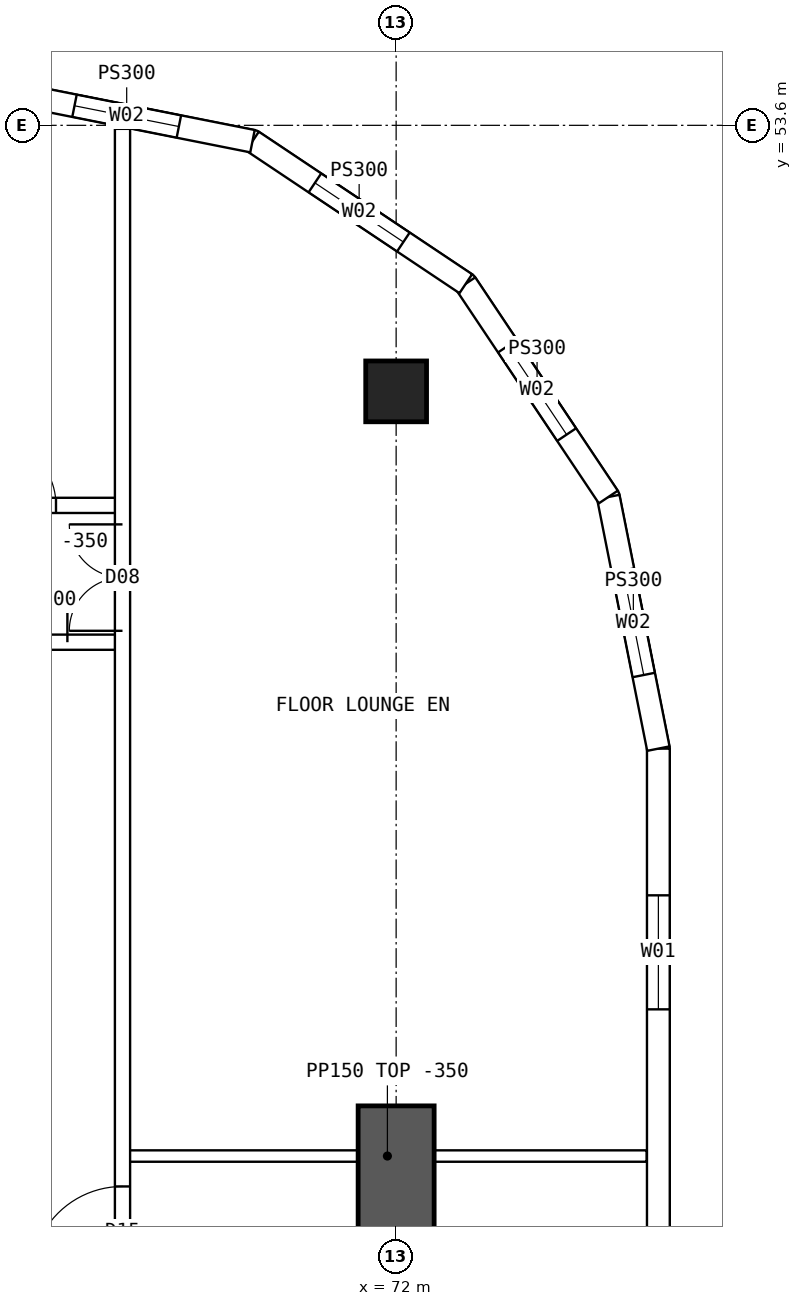
"""IFC4 building model, lengths in metres.
Left out: names, types, materials, properties, quantities, classifications, styles, units other than length and angle.
Written with IfcOpenShell. Run it as: python <this file> out.ifc"""

import sys

from ifc_helpers import new_model, si_unit, direction, frame, frame_2d, origin, origin_2d, place, context, subcontext, project, spatial, polyline, rectangle, hollow_rectangle, outline, extrude, element, fill, save


model = new_model("IFC4")
c1 = context("Model", 3, precision=1e-05, world=origin(), true_north=direction((0.0, 1.0)))
c2 = subcontext(c1, "Body", "Model", "MODEL_VIEW")
j1 = project(units=[si_unit("LENGTHUNIT", "METRE"), si_unit("PLANEANGLEUNIT", "RADIAN")], contexts=[c1])
p1 = place(None, origin())
s1 = spatial("IfcSite", under=j1, at=p1, CompositionType="ELEMENT")
p2 = place(p1, origin())
s2 = spatial("IfcBuilding", under=s1, at=p2, CompositionType="ELEMENT")
p3 = place(p2, frame((0.0, 0.0, 197.35)))
s3 = spatial("IfcBuildingStorey", under=s2, at=p3, CompositionType="ELEMENT", Elevation=197.35)
p4 = place(p3, frame((72.0, 50.1, 0.0), z_axis=(0.0, 0.0, 1.0), x_axis=(1.0, 0.0, 0.0)))
e1 = element("IfcColumn", 1, at=p4, inside=s3, PredefinedType="COLUMN", context=c2, shape_type="SweptSolid", body=[
    extrude(hollow_rectangle(XDim=0.8, YDim=0.8, WallThickness=0.08, at=origin_2d()), origin(), (0.0, 0.0, 1.0), 3.75),
])
p5 = place(p3, frame((72.0, 35.7, 0.0), z_axis=(0.0, 0.0, 1.0), x_axis=(0.0, 1.0, 0.0)))
e2 = element("IfcWall", 2, at=p5, inside=s3, PredefinedType="SHEAR", context=c2, shape_type="SweptSolid", body=[
    extrude(rectangle(XDim=5.0, YDim=1.0, at=frame_2d((2.5, 0.0))), origin(), (0.0, 0.0, 1.0), 3.75),
])
p6 = place(p3, frame((75.45, 18.6, 0.0), z_axis=(0.0, 0.0, 1.0), x_axis=(0.0, 1.0, 0.0)))
e3 = element("IfcWall", 3, at=p6, inside=s3, PredefinedType="SOLIDWALL", context=c2, shape_type="SweptSolid", body=[
    extrude(outline(polyline([(-0.015, -0.15), (26.815, -0.15), (26.785, 0.15), (0.015, 0.15), (-0.015, -0.15)])), origin(), (0.0, 0.0, 1.0), 3.4),
])
p7 = place(p6, frame((1.93, 0.0, 0.9)))
e4 = element("IfcOpeningElement", 4, at=p7, cuts=e3, PredefinedType="OPENING", context=c2, shape_type="SweptSolid", body=[
    extrude(rectangle(XDim=1.5, YDim=2.0, at=frame_2d((0.75, 1.0))), frame((0.0, 0.16, 0.0), z_axis=(0.0, -1.0, 0.0), x_axis=(1.0, 0.0, 0.0)), (0.0, 0.0, 1.0), 0.32),
])
p8 = place(p6, frame((7.29, 0.0, 0.9)))
e5 = element("IfcOpeningElement", 5, at=p8, cuts=e3, PredefinedType="OPENING", context=c2, shape_type="SweptSolid", body=[
    extrude(rectangle(XDim=1.5, YDim=2.0, at=frame_2d((0.75, 1.0))), frame((0.0, 0.16, 0.0), z_axis=(0.0, -1.0, 0.0), x_axis=(1.0, 0.0, 0.0)), (0.0, 0.0, 1.0), 0.32),
])
p9 = place(p6, frame((12.65, 0.0, 0.9)))
e6 = element("IfcOpeningElement", 6, at=p9, cuts=e3, PredefinedType="OPENING", context=c2, shape_type="SweptSolid", body=[
    extrude(rectangle(XDim=1.5, YDim=2.0, at=frame_2d((0.75, 1.0))), frame((0.0, 0.16, 0.0), z_axis=(0.0, -1.0, 0.0), x_axis=(1.0, 0.0, 0.0)), (0.0, 0.0, 1.0), 0.32),
])
p10 = place(p6, frame((18.01, 0.0, 0.9)))
e7 = element("IfcOpeningElement", 7, at=p10, cuts=e3, PredefinedType="OPENING", context=c2, shape_type="SweptSolid", body=[
    extrude(rectangle(XDim=1.5, YDim=2.0, at=frame_2d((0.75, 1.0))), frame((0.0, 0.16, 0.0), z_axis=(0.0, -1.0, 0.0), x_axis=(1.0, 0.0, 0.0)), (0.0, 0.0, 1.0), 0.32),
])
p11 = place(p6, frame((23.37, 0.0, 0.9)))
e8 = element("IfcOpeningElement", 8, at=p11, cuts=e3, PredefinedType="OPENING", context=c2, shape_type="SweptSolid", body=[
    extrude(rectangle(XDim=1.5, YDim=2.0, at=frame_2d((0.75, 1.0))), frame((0.0, 0.16, 0.0), z_axis=(0.0, -1.0, 0.0), x_axis=(1.0, 0.0, 0.0)), (0.0, 0.0, 1.0), 0.32),
])
p12 = place(p3, frame((75.45, 45.4, 0.0), z_axis=(0.0, 0.0, 1.0), x_axis=(-0.19508664885, 0.980786011034, 0.0)))
e9 = element("IfcWall", 9, at=p12, inside=s3, PredefinedType="SOLIDWALL", context=c2, shape_type="SweptSolid", body=[
    extrude(outline(polyline([(-0.015, -0.15), (3.405, -0.15), (3.345, 0.15), (0.015, 0.15), (-0.015, -0.15)])), origin(), (0.0, 0.0, 1.0), 3.4),
])
p13 = place(p12, frame((0.988, 0.0, 0.9)))
e10 = element("IfcOpeningElement", 10, at=p13, cuts=e9, PredefinedType="OPENING", context=c2, shape_type="SweptSolid", body=[
    extrude(rectangle(XDim=1.4, YDim=1.8, at=frame_2d((0.7, 0.9))), frame((0.0, 0.16, 0.0), z_axis=(0.0, -1.0, 0.0), x_axis=(1.0, 0.0, 0.0)), (0.0, 0.0, 1.0), 0.32),
])
p14 = place(p3, frame((74.792, 48.71, 0.0), z_axis=(0.0, 0.0, 1.0), x_axis=(-0.555534554399, 0.831493450887, 0.0)))
e11 = element("IfcWall", 11, at=p14, inside=s3, PredefinedType="SOLIDWALL", context=c2, shape_type="SweptSolid", body=[
    extrude(outline(polyline([(-0.03, -0.15), (3.405, -0.15), (3.345, 0.15), (0.03, 0.15), (-0.03, -0.15)])), origin(), (0.0, 0.0, 1.0), 3.4),
])
p15 = place(p14, frame((0.988, 0.0, 0.9)))
e12 = element("IfcOpeningElement", 12, at=p15, cuts=e11, PredefinedType="OPENING", context=c2, shape_type="SweptSolid", body=[
    extrude(rectangle(XDim=1.4, YDim=1.8, at=frame_2d((0.7, 0.9))), frame((0.0, 0.16, 0.0), z_axis=(0.0, -1.0, 0.0), x_axis=(1.0, 0.0, 0.0)), (0.0, 0.0, 1.0), 0.32),
])
p16 = place(p3, frame((72.917, 51.517, 0.0), z_axis=(0.0, 0.0, 1.0), x_axis=(-0.831493450887, 0.555534554399, 0.0)))
e13 = element("IfcWall", 13, at=p16, inside=s3, PredefinedType="SOLIDWALL", context=c2, shape_type="SweptSolid", body=[
    extrude(outline(polyline([(-0.03, -0.15), (3.405, -0.15), (3.345, 0.15), (0.03, 0.15), (-0.03, -0.15)])), origin(), (0.0, 0.0, 1.0), 3.4),
])
p17 = place(p16, frame((0.988, 0.0, 0.9)))
e14 = element("IfcOpeningElement", 14, at=p17, cuts=e13, PredefinedType="OPENING", context=c2, shape_type="SweptSolid", body=[
    extrude(rectangle(XDim=1.4, YDim=1.8, at=frame_2d((0.7, 0.9))), frame((0.0, 0.16, 0.0), z_axis=(0.0, -1.0, 0.0), x_axis=(1.0, 0.0, 0.0)), (0.0, 0.0, 1.0), 0.32),
])
p18 = place(p3, frame((70.11, 53.392, 0.0), z_axis=(0.0, 0.0, 1.0), x_axis=(-0.98078325777, 0.195100490205, 0.0)))
e15 = element("IfcWall", 15, at=p18, inside=s3, PredefinedType="SOLIDWALL", context=c2, shape_type="SweptSolid", body=[
    extrude(outline(polyline([(-0.03, -0.15), (3.405, -0.15), (3.345, 0.15), (0.03, 0.15), (-0.03, -0.15)])), origin(), (0.0, 0.0, 1.0), 3.4),
])
p19 = place(p18, frame((0.988, 0.0, 0.9)))
e16 = element("IfcOpeningElement", 16, at=p19, cuts=e15, PredefinedType="OPENING", context=c2, shape_type="SweptSolid", body=[
    extrude(rectangle(XDim=1.4, YDim=1.8, at=frame_2d((0.7, 0.9))), frame((0.0, 0.16, 0.0), z_axis=(0.0, -1.0, 0.0), x_axis=(1.0, 0.0, 0.0)), (0.0, 0.0, 1.0), 0.32),
])
p20 = place(p3, frame((66.425, 48.6, 0.0), z_axis=(0.0, 0.0, 1.0), x_axis=(1.0, 0.0, 0.0)))
e17 = element("IfcWall", 17, at=p20, inside=s3, PredefinedType="SOLIDWALL", context=c2, shape_type="SweptSolid", body=[
    extrude(rectangle(XDim=1.975, YDim=0.2, at=frame_2d((0.987, 0.0))), origin(), (0.0, 0.0, 1.0), 3.4),
])
p21 = place(p20, frame((0.2, 0.0, 0.0)))
e18 = element("IfcOpeningElement", 18, at=p21, cuts=e17, PredefinedType="OPENING", context=c2, shape_type="SweptSolid", body=[
    extrude(rectangle(XDim=0.9, YDim=2.1, at=frame_2d((0.45, 1.05))), frame((0.0, 0.11, 0.0), z_axis=(0.0, -1.0, 0.0), x_axis=(1.0, 0.0, 0.0)), (0.0, 0.0, 1.0), 0.22),
])
p22 = place(p3, frame((66.425, 46.8, 0.0), z_axis=(0.0, 0.0, 1.0), x_axis=(1.0, 0.0, 0.0)))
e19 = element("IfcWall", 19, at=p22, inside=s3, PredefinedType="SOLIDWALL", context=c2, shape_type="SweptSolid", body=[
    extrude(rectangle(XDim=1.975, YDim=0.2, at=frame_2d((0.987, 0.0))), origin(), (0.0, 0.0, 1.0), 3.4),
])
p23 = place(p22, frame((0.05, 0.0, 0.0)))
e20 = element("IfcOpeningElement", 20, at=p23, cuts=e19, PredefinedType="OPENING", context=c2, shape_type="SweptSolid", body=[
    extrude(rectangle(XDim=1.2, YDim=2.1, at=frame_2d((0.6, 1.05))), frame((0.0, 0.11, 0.0), z_axis=(0.0, -1.0, 0.0), x_axis=(1.0, 0.0, 0.0)), (0.0, 0.0, 1.0), 0.22),
])
p24 = place(p3, frame((68.4, 10.446, 0.0), z_axis=(0.0, 0.0, 1.0), x_axis=(0.0, 1.0, 0.0)))
e21 = element("IfcWall", 21, at=p24, inside=s3, PredefinedType="SOLIDWALL", context=c2, shape_type="SweptSolid", body=[
    extrude(rectangle(XDim=43.107, YDim=0.2, at=frame_2d((21.554, 0.0))), origin(), (0.0, 0.0, 1.0), 3.4),
])
p25 = place(p24, frame((27.994, 0.0, 0.0)))
e22 = element("IfcOpeningElement", 22, at=p25, cuts=e21, PredefinedType="OPENING", context=c2, shape_type="SweptSolid", body=[
    extrude(rectangle(XDim=1.2, YDim=2.1, at=frame_2d((0.6, 1.05))), frame((0.0, 0.11, 0.0), z_axis=(0.0, -1.0, 0.0), x_axis=(1.0, 0.0, 0.0)), (0.0, 0.0, 1.0), 0.22),
])
p26 = place(p24, frame((5.104, 0.0, 0.0)))
e23 = element("IfcOpeningElement", 23, at=p26, cuts=e21, PredefinedType="OPENING", context=c2, shape_type="SweptSolid", body=[
    extrude(rectangle(XDim=1.4, YDim=2.1, at=frame_2d((0.7, 1.05))), frame((0.0, 0.11, 0.0), z_axis=(0.0, -1.0, 0.0), x_axis=(1.0, 0.0, 0.0)), (0.0, 0.0, 1.0), 0.22),
])
p27 = place(p24, frame((36.504, 0.0, 0.0)))
e24 = element("IfcOpeningElement", 24, at=p27, cuts=e21, PredefinedType="OPENING", context=c2, shape_type="SweptSolid", body=[
    extrude(rectangle(XDim=1.4, YDim=2.1, at=frame_2d((0.7, 1.05))), frame((0.0, 0.11, 0.0), z_axis=(0.0, -1.0, 0.0), x_axis=(1.0, 0.0, 0.0)), (0.0, 0.0, 1.0), 0.22),
])
p28 = place(p3, frame((68.475, 40.04, 0.0), z_axis=(0.0, 0.0, 1.0), x_axis=(1.0, 0.0, 0.0)))
e25 = element("IfcWall", 25, at=p28, inside=s3, PredefinedType="PARTITIONING", context=c2, shape_type="SweptSolid", body=[
    extrude(rectangle(XDim=6.82, YDim=0.15, at=frame_2d((3.41, 0.0))), origin(), (0.0, 0.0, 1.0), 3.4),
])
p29 = place(p11, origin())
e26 = element("IfcWindow", 26, at=p29, inside=s3, PartitioningType="SINGLE_PANEL", PredefinedType="WINDOW", context=c2, shape_type="SweptSolid", body=[
    extrude(rectangle(XDim=1.5, YDim=2.0, at=frame_2d((0.75, 1.0))), frame((0.0, 0.03, 0.0), z_axis=(0.0, -1.0, 0.0), x_axis=(1.0, 0.0, 0.0)), (0.0, 0.0, 1.0), 0.06),
])
fill(e8, e26)
p30 = place(p13, origin())
e27 = element("IfcWindow", 27, at=p30, inside=s3, PartitioningType="SINGLE_PANEL", PredefinedType="WINDOW", context=c2, shape_type="SweptSolid", body=[
    extrude(rectangle(XDim=1.4, YDim=1.8, at=frame_2d((0.7, 0.9))), frame((0.0, 0.03, 0.0), z_axis=(0.0, -1.0, 0.0), x_axis=(1.0, 0.0, 0.0)), (0.0, 0.0, 1.0), 0.06),
])
fill(e10, e27)
p31 = place(p15, origin())
e28 = element("IfcWindow", 28, at=p31, inside=s3, PartitioningType="SINGLE_PANEL", PredefinedType="WINDOW", context=c2, shape_type="SweptSolid", body=[
    extrude(rectangle(XDim=1.4, YDim=1.8, at=frame_2d((0.7, 0.9))), frame((0.0, 0.03, 0.0), z_axis=(0.0, -1.0, 0.0), x_axis=(1.0, 0.0, 0.0)), (0.0, 0.0, 1.0), 0.06),
])
fill(e12, e28)
p32 = place(p17, origin())
e29 = element("IfcWindow", 29, at=p32, inside=s3, PartitioningType="SINGLE_PANEL", PredefinedType="WINDOW", context=c2, shape_type="SweptSolid", body=[
    extrude(rectangle(XDim=1.4, YDim=1.8, at=frame_2d((0.7, 0.9))), frame((0.0, 0.03, 0.0), z_axis=(0.0, -1.0, 0.0), x_axis=(1.0, 0.0, 0.0)), (0.0, 0.0, 1.0), 0.06),
])
fill(e14, e29)
p33 = place(p19, origin())
e30 = element("IfcWindow", 30, at=p33, inside=s3, PartitioningType="SINGLE_PANEL", PredefinedType="WINDOW", context=c2, shape_type="SweptSolid", body=[
    extrude(rectangle(XDim=1.4, YDim=1.8, at=frame_2d((0.7, 0.9))), frame((0.0, 0.03, 0.0), z_axis=(0.0, -1.0, 0.0), x_axis=(1.0, 0.0, 0.0)), (0.0, 0.0, 1.0), 0.06),
])
fill(e16, e30)
p34 = place(p23, origin())
e31 = element("IfcDoor", 31, at=p34, inside=s3, OperationType="DOUBLE_DOOR_SINGLE_SWING", PredefinedType="DOOR", context=c2, shape_type="SweptSolid", body=[
    extrude(rectangle(XDim=1.2, YDim=2.1, at=frame_2d((0.6, 1.05))), frame((0.0, 0.025, 0.0), z_axis=(0.0, -1.0, 0.0), x_axis=(1.0, 0.0, 0.0)), (0.0, 0.0, 1.0), 0.05),
])
fill(e20, e31)
p35 = place(p25, origin())
e32 = element("IfcDoor", 32, at=p35, inside=s3, OperationType="SINGLE_SWING_LEFT", PredefinedType="DOOR", context=c2, shape_type="SweptSolid", body=[
    extrude(rectangle(XDim=1.2, YDim=2.1, at=frame_2d((0.6, 1.05))), frame((0.0, 0.025, 0.0), z_axis=(0.0, -1.0, 0.0), x_axis=(1.0, 0.0, 0.0)), (0.0, 0.0, 1.0), 0.05),
])
fill(e22, e32)
p36 = place(p27, origin())
e33 = element("IfcDoor", 33, at=p36, inside=s3, OperationType="DOUBLE_DOOR_SINGLE_SWING", PredefinedType="DOOR", context=c2, shape_type="SweptSolid", body=[
    extrude(rectangle(XDim=1.4, YDim=2.1, at=frame_2d((0.7, 1.05))), frame((0.0, 0.025, 0.0), z_axis=(0.0, -1.0, 0.0), x_axis=(1.0, 0.0, 0.0)), (0.0, 0.0, 1.0), 0.05),
])
fill(e24, e33)
p37 = place(p21, origin())
e34 = element("IfcDoor", 34, at=p37, inside=s3, OperationType="SINGLE_SWING_LEFT", PredefinedType="DOOR", context=c2, shape_type="SweptSolid", body=[
    extrude(rectangle(XDim=0.9, YDim=2.1, at=frame_2d((0.45, 1.05))), frame((0.0, 0.025, 0.0), z_axis=(0.0, -1.0, 0.0), x_axis=(1.0, 0.0, 0.0)), (0.0, 0.0, 1.0), 0.05),
])
fill(e18, e34)
save(model, sys.argv[1])
